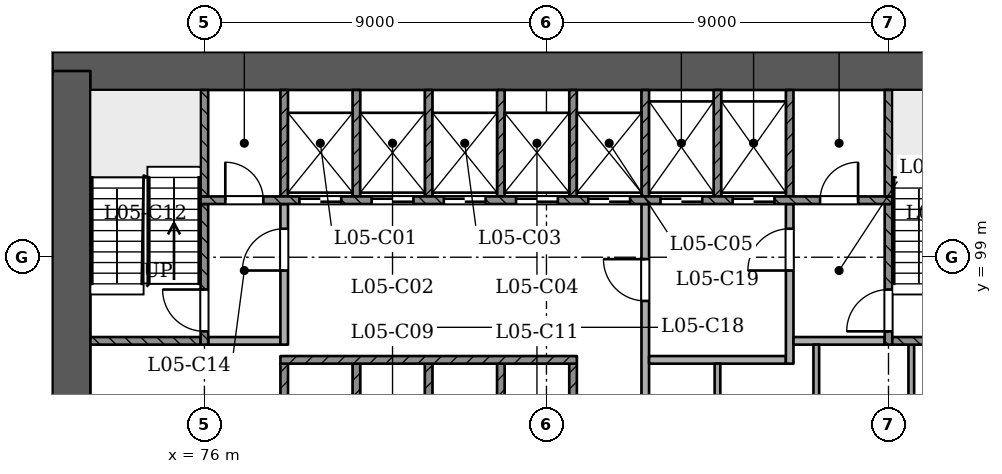
"""IFC4 building model, lengths in metres.
Left out: names, types, materials, properties, quantities, classifications, styles, units other than length and angle.
Written with IfcOpenShell. Run it as: python <this file> out.ifc"""

import sys

from ifc_helpers import new_model, si_unit, direction, frame, frame_2d, origin, place, context, subcontext, project, spatial, rectangle, extrude, element, fill, save


model = new_model("IFC4")
c1 = context("Model", 3, precision=1e-05, world=origin(), true_north=direction((0.0, 1.0)))
c2 = subcontext(c1, "Body", "Model", "MODEL_VIEW")
j1 = project(units=[si_unit("LENGTHUNIT", "METRE"), si_unit("PLANEANGLEUNIT", "RADIAN")], contexts=[c1])
p1 = place(None, origin())
s1 = spatial("IfcSite", under=j1, at=p1, CompositionType="ELEMENT")
p2 = place(p1, origin())
s2 = spatial("IfcBuilding", under=s1, at=p2, CompositionType="ELEMENT")
p3 = place(p2, frame((0.0, 0.0, 27.0)))
s3 = spatial("IfcBuildingStorey", under=s2, at=p3, CompositionType="ELEMENT", Elevation=27.0)
p4 = place(p3, frame((97.5, 103.9, 0.0), z_axis=(0.0, 0.0, 1.0), x_axis=(-1.0, 0.0, 0.0)))
e1 = element("IfcWall", 1, at=p4, inside=s3, PredefinedType="SHEAR", context=c2, shape_type="SweptSolid", body=[
    extrude(rectangle(XDim=25.5, YDim=1.0, at=frame_2d((12.75, 0.0))), origin(), (0.0, 0.0, 1.0), 3.6),
])
p5 = place(p3, frame((72.5, 103.9, 0.0), z_axis=(0.0, 0.0, 1.0), x_axis=(0.0, -1.0, 0.0)))
e2 = element("IfcWall", 2, at=p5, inside=s3, PredefinedType="SHEAR", context=c2, shape_type="SweptSolid", body=[
    extrude(rectangle(XDim=11.5, YDim=1.0, at=frame_2d((5.75, 0.0))), origin(), (0.0, 0.0, 1.0), 3.6),
])
p6 = place(p3, frame((61.193, 96.236, 0.0), z_axis=(0.0, 0.0, 1.0), x_axis=(0.49999953585, -0.866025671762, 0.0)))
e3 = element("IfcWall", 3, at=p6, inside=s3, PredefinedType="PARTITIONING", context=c2, shape_type="SweptSolid", body=[
    extrude(rectangle(XDim=45.0, YDim=0.15, at=frame_2d((22.5, 0.0))), origin(), (0.0, 0.0, 1.0), 2.7),
])
p7 = place(p6, frame((1.75, 0.0, 0.0)))
e4 = element("IfcOpeningElement", 4, at=p7, cuts=e3, PredefinedType="OPENING", context=c2, shape_type="SweptSolid", body=[
    extrude(rectangle(XDim=1.0, YDim=2.1, at=frame_2d((0.5, 1.05))), frame((0.0, 0.085, 0.0), z_axis=(0.0, -1.0, 0.0), x_axis=(1.0, 0.0, 0.0)), (0.0, 0.0, 1.0), 0.171),
])
p8 = place(p6, frame((7.3, 0.0, 0.0)))
e5 = element("IfcOpeningElement", 5, at=p8, cuts=e3, PredefinedType="OPENING", context=c2, shape_type="SweptSolid", body=[
    extrude(rectangle(XDim=1.2, YDim=2.1, at=frame_2d((0.6, 1.05))), frame((0.0, 0.085, 0.0), z_axis=(0.0, -1.0, 0.0), x_axis=(1.0, 0.0, 0.0)), (0.0, 0.0, 1.0), 0.171),
])
p9 = place(p6, frame((14.071, 0.0, 0.0)))
e6 = element("IfcOpeningElement", 6, at=p9, cuts=e3, PredefinedType="OPENING", context=c2, shape_type="SweptSolid", body=[
    extrude(rectangle(XDim=1.1, YDim=2.1, at=frame_2d((0.55, 1.05))), frame((0.0, 0.085, 0.0), z_axis=(0.0, -1.0, 0.0), x_axis=(1.0, 0.0, 0.0)), (0.0, 0.0, 1.0), 0.171),
])
p10 = place(p6, frame((20.78, 0.0, 0.0)))
e7 = element("IfcOpeningElement", 7, at=p10, cuts=e3, PredefinedType="OPENING", context=c2, shape_type="SweptSolid", body=[
    extrude(rectangle(XDim=1.0, YDim=2.1, at=frame_2d((0.5, 1.05))), frame((0.0, 0.085, 0.0), z_axis=(0.0, -1.0, 0.0), x_axis=(1.0, 0.0, 0.0)), (0.0, 0.0, 1.0), 0.171),
])
p11 = place(p6, frame((23.105, 0.0, 0.0)))
e8 = element("IfcOpeningElement", 8, at=p11, cuts=e3, PredefinedType="OPENING", context=c2, shape_type="SweptSolid", body=[
    extrude(rectangle(XDim=1.0, YDim=2.1, at=frame_2d((0.5, 1.05))), frame((0.0, 0.085, 0.0), z_axis=(0.0, -1.0, 0.0), x_axis=(1.0, 0.0, 0.0)), (0.0, 0.0, 1.0), 0.171),
])
p12 = place(p6, frame((28.75, 0.0, 0.0)))
e9 = element("IfcOpeningElement", 9, at=p12, cuts=e3, PredefinedType="OPENING", context=c2, shape_type="SweptSolid", body=[
    extrude(rectangle(XDim=1.0, YDim=2.1, at=frame_2d((0.5, 1.05))), frame((0.0, 0.085, 0.0), z_axis=(0.0, -1.0, 0.0), x_axis=(1.0, 0.0, 0.0)), (0.0, 0.0, 1.0), 0.171),
])
p13 = place(p6, frame((34.3, 0.0, 0.0)))
e10 = element("IfcOpeningElement", 10, at=p13, cuts=e3, PredefinedType="OPENING", context=c2, shape_type="SweptSolid", body=[
    extrude(rectangle(XDim=1.2, YDim=2.1, at=frame_2d((0.6, 1.05))), frame((0.0, 0.085, 0.0), z_axis=(0.0, -1.0, 0.0), x_axis=(1.0, 0.0, 0.0)), (0.0, 0.0, 1.0), 0.171),
])
p14 = place(p6, frame((43.28, 0.0, 0.0)))
e11 = element("IfcOpeningElement", 11, at=p14, cuts=e3, PredefinedType="OPENING", context=c2, shape_type="SweptSolid", body=[
    extrude(rectangle(XDim=1.0, YDim=2.1, at=frame_2d((0.5, 1.05))), frame((0.0, 0.085, 0.0), z_axis=(0.0, -1.0, 0.0), x_axis=(1.0, 0.0, 0.0)), (0.0, 0.0, 1.0), 0.171),
])
for number, where, z_axis, x_axis in (
    (12, (78.1, 93.4, 0.0), (0.0, 0.0, 1.0), (0.0, 1.0, 0.0)),
    (13, (80.0, 93.4, 0.0), (0.0, 0.0, 1.0), (0.0, 1.0, 0.0)),
    (14, (81.9, 93.4, 0.0), (0.0, 0.0, 1.0), (0.0, 1.0, 0.0)),
    (15, (83.8, 93.4, 0.0), (0.0, 0.0, 1.0), (0.0, 1.0, 0.0)),
    (16, (85.7, 93.4, 0.0), (0.0, 0.0, 1.0), (0.0, 1.0, 0.0)),
):
    element("IfcWall", number, at=place(p3, frame(where, z_axis=z_axis, x_axis=x_axis)), inside=s3, PredefinedType="SOLIDWALL", context=c2, shape_type="SweptSolid", body=[
        extrude(rectangle(XDim=2.8, YDim=0.2, at=frame_2d((1.4, 0.0))), origin(), (0.0, 0.0, 1.0), 3.1),
    ])
p15 = place(p3, frame((87.6, 93.4, 0.0), z_axis=(0.0, 0.0, 1.0), x_axis=(0.0, 1.0, 0.0)))
e17 = element("IfcWall", 17, at=p15, inside=s3, PredefinedType="PARTITIONING", context=c2, shape_type="SweptSolid", body=[
    extrude(rectangle(XDim=7.0, YDim=0.2, at=frame_2d((3.5, 0.0))), origin(), (0.0, 0.0, 1.0), 3.1),
])
p16 = place(p15, frame((4.45, 0.0, 0.0)))
e18 = element("IfcOpeningElement", 18, at=p16, cuts=e17, PredefinedType="OPENING", context=c2, shape_type="SweptSolid", body=[
    extrude(rectangle(XDim=1.1, YDim=2.1, at=frame_2d((0.55, 1.05))), frame((0.0, 0.11, 0.0), z_axis=(0.0, -1.0, 0.0), x_axis=(1.0, 0.0, 0.0)), (0.0, 0.0, 1.0), 0.221),
])
p17 = place(p3, frame((89.5, 93.4, 0.0), z_axis=(0.0, 0.0, 1.0), x_axis=(0.0, 1.0, 0.0)))
e19 = element("IfcWall", 19, at=p17, inside=s3, PredefinedType="PARTITIONING", context=c2, shape_type="SweptSolid", body=[
    extrude(rectangle(XDim=2.8, YDim=0.15, at=frame_2d((1.4, 0.0))), origin(), (0.0, 0.0, 1.0), 3.1),
])
for number, where, z_axis, x_axis in (
    (20, (92.1, 93.4, 0.0), (0.0, 0.0, 1.0), (0.0, 1.0, 0.0)),
    (21, (94.6, 93.4, 0.0), (0.0, 0.0, 1.0), (0.0, 1.0, 0.0)),
):
    element("IfcWall", number, at=place(p3, frame(where, z_axis=z_axis, x_axis=x_axis)), inside=s3, PredefinedType="PARTITIONING", context=c2, shape_type="SweptSolid", body=[
        extrude(rectangle(XDim=3.3, YDim=0.15, at=frame_2d((1.65, 0.0))), origin(), (0.0, 0.0, 1.0), 3.1),
    ])
p18 = place(p3, frame((78.0, 96.3, 0.0), z_axis=(0.0, 0.0, 1.0), x_axis=(1.0, 0.0, 0.0)))
e22 = element("IfcWall", 22, at=p18, inside=s3, PredefinedType="SOLIDWALL", context=c2, shape_type="SweptSolid", body=[
    extrude(rectangle(XDim=7.8, YDim=0.2, at=frame_2d((3.9, 0.0))), origin(), (0.0, 0.0, 1.0), 3.1),
])
p19 = place(p3, frame((87.7, 96.3, 0.0), z_axis=(0.0, 0.0, 1.0), x_axis=(1.0, 0.0, 0.0)))
e23 = element("IfcWall", 23, at=p19, inside=s3, PredefinedType="PARTITIONING", context=c2, shape_type="SweptSolid", body=[
    extrude(rectangle(XDim=3.6, YDim=0.2, at=frame_2d((1.8, 0.0))), origin(), (0.0, 0.0, 1.0), 3.1),
])
p20 = place(p3, frame((91.4, 96.2, 0.0), z_axis=(0.0, 0.0, 1.0), x_axis=(0.0, 1.0, 0.0)))
e24 = element("IfcWall", 24, at=p20, inside=s3, PredefinedType="PARTITIONING", context=c2, shape_type="SweptSolid", body=[
    extrude(rectangle(XDim=4.2, YDim=0.2, at=frame_2d((2.1, 0.0))), origin(), (0.0, 0.0, 1.0), 3.1),
])
p21 = place(p20, frame((2.45, 0.0, 0.0)))
e25 = element("IfcOpeningElement", 25, at=p21, cuts=e24, PredefinedType="OPENING", context=c2, shape_type="SweptSolid", body=[
    extrude(rectangle(XDim=1.1, YDim=2.1, at=frame_2d((0.55, 1.05))), frame((0.0, 0.11, 0.0), z_axis=(0.0, -1.0, 0.0), x_axis=(1.0, 0.0, 0.0)), (0.0, 0.0, 1.0), 0.221),
])
p22 = place(p3, frame((73.0, 96.8, 0.0), z_axis=(0.0, 0.0, 1.0), x_axis=(1.0, 0.0, 0.0)))
e26 = element("IfcWall", 26, at=p22, inside=s3, PredefinedType="SOLIDWALL", context=c2, shape_type="SweptSolid", body=[
    extrude(rectangle(XDim=2.9, YDim=0.2, at=frame_2d((1.45, 0.0))), origin(), (0.0, 0.0, 1.0), 3.1),
])
p23 = place(p3, frame((76.0, 96.7, 0.0), z_axis=(0.0, 0.0, 1.0), x_axis=(0.0, 1.0, 0.0)))
e27 = element("IfcWall", 27, at=p23, inside=s3, PredefinedType="SOLIDWALL", context=c2, shape_type="SweptSolid", body=[
    extrude(rectangle(XDim=3.7, YDim=0.2, at=frame_2d((1.85, 0.0))), origin(), (0.0, 0.0, 1.0), 3.1),
])
p24 = place(p23, frame((0.35, 0.0, 0.0)))
e28 = element("IfcOpeningElement", 28, at=p24, cuts=e27, PredefinedType="OPENING", context=c2, shape_type="SweptSolid", body=[
    extrude(rectangle(XDim=1.1, YDim=2.1, at=frame_2d((0.55, 1.05))), frame((0.0, 0.11, 0.0), z_axis=(0.0, -1.0, 0.0), x_axis=(1.0, 0.0, 0.0)), (0.0, 0.0, 1.0), 0.221),
])
p25 = place(p3, frame((76.1, 96.8, 0.0), z_axis=(0.0, 0.0, 1.0), x_axis=(1.0, 0.0, 0.0)))
e29 = element("IfcWall", 29, at=p25, inside=s3, PredefinedType="PARTITIONING", context=c2, shape_type="SweptSolid", body=[
    extrude(rectangle(XDim=1.9, YDim=0.2, at=frame_2d((0.95, 0.0))), origin(), (0.0, 0.0, 1.0), 3.1),
])
p26 = place(p3, frame((78.1, 96.7, 0.0), z_axis=(0.0, 0.0, 1.0), x_axis=(0.0, 1.0, 0.0)))
e30 = element("IfcWall", 30, at=p26, inside=s3, PredefinedType="PARTITIONING", context=c2, shape_type="SweptSolid", body=[
    extrude(rectangle(XDim=3.7, YDim=0.2, at=frame_2d((1.85, 0.0))), origin(), (0.0, 0.0, 1.0), 3.1),
])
p27 = place(p26, frame((1.95, 0.0, 0.0)))
e31 = element("IfcOpeningElement", 31, at=p27, cuts=e30, PredefinedType="OPENING", context=c2, shape_type="SweptSolid", body=[
    extrude(rectangle(XDim=1.1, YDim=2.1, at=frame_2d((0.55, 1.05))), frame((0.0, 0.11, 0.0), z_axis=(0.0, -1.0, 0.0), x_axis=(1.0, 0.0, 0.0)), (0.0, 0.0, 1.0), 0.221),
])
p28 = place(p3, frame((91.5, 96.8, 0.0), z_axis=(0.0, 0.0, 1.0), x_axis=(1.0, 0.0, 0.0)))
e32 = element("IfcWall", 32, at=p28, inside=s3, PredefinedType="PARTITIONING", context=c2, shape_type="SweptSolid", body=[
    extrude(rectangle(XDim=2.4, YDim=0.2, at=frame_2d((1.2, 0.0))), origin(), (0.0, 0.0, 1.0), 3.1),
])
p29 = place(p3, frame((94.0, 96.7, 0.0), z_axis=(0.0, 0.0, 1.0), x_axis=(0.0, 1.0, 0.0)))
e33 = element("IfcWall", 33, at=p29, inside=s3, PredefinedType="SOLIDWALL", context=c2, shape_type="SweptSolid", body=[
    extrude(rectangle(XDim=3.7, YDim=0.2, at=frame_2d((1.85, 0.0))), origin(), (0.0, 0.0, 1.0), 3.1),
])
p30 = place(p29, frame((0.35, 0.0, 0.0)))
e34 = element("IfcOpeningElement", 34, at=p30, cuts=e33, PredefinedType="OPENING", context=c2, shape_type="SweptSolid", body=[
    extrude(rectangle(XDim=1.1, YDim=2.1, at=frame_2d((0.55, 1.05))), frame((0.0, 0.11, 0.0), z_axis=(0.0, -1.0, 0.0), x_axis=(1.0, 0.0, 0.0)), (0.0, 0.0, 1.0), 0.221),
])
p31 = place(p3, frame((94.1, 96.8, 0.0), z_axis=(0.0, 0.0, 1.0), x_axis=(1.0, 0.0, 0.0)))
e35 = element("IfcWall", 35, at=p31, inside=s3, PredefinedType="SOLIDWALL", context=c2, shape_type="SweptSolid", body=[
    extrude(rectangle(XDim=2.9, YDim=0.2, at=frame_2d((1.45, 0.0))), origin(), (0.0, 0.0, 1.0), 3.1),
])
p32 = place(p3, frame((75.9, 100.5, 0.0), z_axis=(0.0, 0.0, 1.0), x_axis=(1.0, 0.0, 0.0)))
e36 = element("IfcWall", 36, at=p32, inside=s3, PredefinedType="SOLIDWALL", context=c2, shape_type="SweptSolid", body=[
    extrude(rectangle(XDim=18.2, YDim=0.2, at=frame_2d((9.1, 0.0))), origin(), (0.0, 0.0, 1.0), 3.1),
])
p33 = place(p32, frame((2.6, 0.0, 0.0)))
e37 = element("IfcOpeningElement", 37, at=p33, cuts=e36, PredefinedType="OPENING", context=c2, shape_type="SweptSolid", body=[
    extrude(rectangle(XDim=1.1, YDim=2.1, at=frame_2d((0.55, 1.05))), frame((0.0, 0.11, 0.0), z_axis=(0.0, -1.0, 0.0), x_axis=(1.0, 0.0, 0.0)), (0.0, 0.0, 1.0), 0.221),
])
p34 = place(p32, frame((4.5, 0.0, 0.0)))
e38 = element("IfcOpeningElement", 38, at=p34, cuts=e36, PredefinedType="OPENING", context=c2, shape_type="SweptSolid", body=[
    extrude(rectangle(XDim=1.1, YDim=2.1, at=frame_2d((0.55, 1.05))), frame((0.0, 0.11, 0.0), z_axis=(0.0, -1.0, 0.0), x_axis=(1.0, 0.0, 0.0)), (0.0, 0.0, 1.0), 0.221),
])
p35 = place(p32, frame((6.4, 0.0, 0.0)))
e39 = element("IfcOpeningElement", 39, at=p35, cuts=e36, PredefinedType="OPENING", context=c2, shape_type="SweptSolid", body=[
    extrude(rectangle(XDim=1.1, YDim=2.1, at=frame_2d((0.55, 1.05))), frame((0.0, 0.11, 0.0), z_axis=(0.0, -1.0, 0.0), x_axis=(1.0, 0.0, 0.0)), (0.0, 0.0, 1.0), 0.221),
])
p36 = place(p32, frame((8.3, 0.0, 0.0)))
e40 = element("IfcOpeningElement", 40, at=p36, cuts=e36, PredefinedType="OPENING", context=c2, shape_type="SweptSolid", body=[
    extrude(rectangle(XDim=1.1, YDim=2.1, at=frame_2d((0.55, 1.05))), frame((0.0, 0.11, 0.0), z_axis=(0.0, -1.0, 0.0), x_axis=(1.0, 0.0, 0.0)), (0.0, 0.0, 1.0), 0.221),
])
p37 = place(p32, frame((10.2, 0.0, 0.0)))
e41 = element("IfcOpeningElement", 41, at=p37, cuts=e36, PredefinedType="OPENING", context=c2, shape_type="SweptSolid", body=[
    extrude(rectangle(XDim=1.1, YDim=2.1, at=frame_2d((0.55, 1.05))), frame((0.0, 0.11, 0.0), z_axis=(0.0, -1.0, 0.0), x_axis=(1.0, 0.0, 0.0)), (0.0, 0.0, 1.0), 0.221),
])
p38 = place(p32, frame((12.1, 0.0, 0.0)))
e42 = element("IfcOpeningElement", 42, at=p38, cuts=e36, PredefinedType="OPENING", context=c2, shape_type="SweptSolid", body=[
    extrude(rectangle(XDim=1.1, YDim=2.1, at=frame_2d((0.55, 1.05))), frame((0.0, 0.11, 0.0), z_axis=(0.0, -1.0, 0.0), x_axis=(1.0, 0.0, 0.0)), (0.0, 0.0, 1.0), 0.221),
])
p39 = place(p32, frame((14.0, 0.0, 0.0)))
e43 = element("IfcOpeningElement", 43, at=p39, cuts=e36, PredefinedType="OPENING", context=c2, shape_type="SweptSolid", body=[
    extrude(rectangle(XDim=1.1, YDim=2.1, at=frame_2d((0.55, 1.05))), frame((0.0, 0.11, 0.0), z_axis=(0.0, -1.0, 0.0), x_axis=(1.0, 0.0, 0.0)), (0.0, 0.0, 1.0), 0.221),
])
p40 = place(p32, frame((0.65, 0.0, 0.0)))
e44 = element("IfcOpeningElement", 44, at=p40, cuts=e36, PredefinedType="OPENING", context=c2, shape_type="SweptSolid", body=[
    extrude(rectangle(XDim=1.0, YDim=2.1, at=frame_2d((0.5, 1.05))), frame((0.0, 0.11, 0.0), z_axis=(0.0, -1.0, 0.0), x_axis=(1.0, 0.0, 0.0)), (0.0, 0.0, 1.0), 0.221),
])
p41 = place(p32, frame((16.3, 0.0, 0.0)))
e45 = element("IfcOpeningElement", 45, at=p41, cuts=e36, PredefinedType="OPENING", context=c2, shape_type="SweptSolid", body=[
    extrude(rectangle(XDim=1.0, YDim=2.1, at=frame_2d((0.5, 1.05))), frame((0.0, 0.11, 0.0), z_axis=(0.0, -1.0, 0.0), x_axis=(1.0, 0.0, 0.0)), (0.0, 0.0, 1.0), 0.221),
])
for number, where, z_axis, x_axis in (
    (46, (76.0, 100.6, 0.0), (0.0, 0.0, 1.0), (0.0, 1.0, 0.0)),
    (47, (78.1, 100.6, 0.0), (0.0, 0.0, 1.0), (0.0, 1.0, 0.0)),
    (48, (80.0, 100.6, 0.0), (0.0, 0.0, 1.0), (0.0, 1.0, 0.0)),
    (49, (81.9, 100.6, 0.0), (0.0, 0.0, 1.0), (0.0, 1.0, 0.0)),
    (50, (83.8, 100.6, 0.0), (0.0, 0.0, 1.0), (0.0, 1.0, 0.0)),
    (51, (85.7, 100.6, 0.0), (0.0, 0.0, 1.0), (0.0, 1.0, 0.0)),
    (52, (87.6, 100.6, 0.0), (0.0, 0.0, 1.0), (0.0, 1.0, 0.0)),
    (53, (89.5, 100.6, 0.0), (0.0, 0.0, 1.0), (0.0, 1.0, 0.0)),
    (54, (91.4, 100.6, 0.0), (0.0, 0.0, 1.0), (0.0, 1.0, 0.0)),
    (55, (94.0, 100.6, 0.0), (0.0, 0.0, 1.0), (0.0, 1.0, 0.0)),
):
    element("IfcWall", number, at=place(p3, frame(where, z_axis=z_axis, x_axis=x_axis)), inside=s3, PredefinedType="SOLIDWALL", context=c2, shape_type="SweptSolid", body=[
        extrude(rectangle(XDim=2.8, YDim=0.2, at=frame_2d((1.4, 0.0))), origin(), (0.0, 0.0, 1.0), 3.1),
    ])
p42 = place(p33, origin())
e56 = element("IfcDoor", 56, at=p42, inside=s3, OperationType="SLIDING_TO_RIGHT", PredefinedType="NOTDEFINED", context=c2, shape_type="SweptSolid", body=[
    extrude(rectangle(XDim=1.1, YDim=2.1, at=frame_2d((0.55, 1.05))), frame((0.0, 0.025, 0.0), z_axis=(0.0, -1.0, 0.0), x_axis=(1.0, 0.0, 0.0)), (0.0, 0.0, 1.0), 0.05),
])
fill(e37, e56)
p43 = place(p34, origin())
e57 = element("IfcDoor", 57, at=p43, inside=s3, OperationType="SLIDING_TO_LEFT", PredefinedType="NOTDEFINED", context=c2, shape_type="SweptSolid", body=[
    extrude(rectangle(XDim=1.1, YDim=2.1, at=frame_2d((0.55, 1.05))), frame((0.0, 0.025, 0.0), z_axis=(0.0, -1.0, 0.0), x_axis=(1.0, 0.0, 0.0)), (0.0, 0.0, 1.0), 0.05),
])
fill(e38, e57)
p44 = place(p35, origin())
e58 = element("IfcDoor", 58, at=p44, inside=s3, OperationType="SLIDING_TO_RIGHT", PredefinedType="NOTDEFINED", context=c2, shape_type="SweptSolid", body=[
    extrude(rectangle(XDim=1.1, YDim=2.1, at=frame_2d((0.55, 1.05))), frame((0.0, 0.025, 0.0), z_axis=(0.0, -1.0, 0.0), x_axis=(1.0, 0.0, 0.0)), (0.0, 0.0, 1.0), 0.05),
])
fill(e39, e58)
p45 = place(p36, origin())
e59 = element("IfcDoor", 59, at=p45, inside=s3, OperationType="SLIDING_TO_LEFT", PredefinedType="NOTDEFINED", context=c2, shape_type="SweptSolid", body=[
    extrude(rectangle(XDim=1.1, YDim=2.1, at=frame_2d((0.55, 1.05))), frame((0.0, 0.025, 0.0), z_axis=(0.0, -1.0, 0.0), x_axis=(1.0, 0.0, 0.0)), (0.0, 0.0, 1.0), 0.05),
])
fill(e40, e59)
p46 = place(p37, origin())
e60 = element("IfcDoor", 60, at=p46, inside=s3, OperationType="SLIDING_TO_RIGHT", PredefinedType="NOTDEFINED", context=c2, shape_type="SweptSolid", body=[
    extrude(rectangle(XDim=1.1, YDim=2.1, at=frame_2d((0.55, 1.05))), frame((0.0, 0.025, 0.0), z_axis=(0.0, -1.0, 0.0), x_axis=(1.0, 0.0, 0.0)), (0.0, 0.0, 1.0), 0.05),
])
fill(e41, e60)
p47 = place(p38, origin())
e61 = element("IfcDoor", 61, at=p47, inside=s3, OperationType="SLIDING_TO_RIGHT", PredefinedType="NOTDEFINED", context=c2, shape_type="SweptSolid", body=[
    extrude(rectangle(XDim=1.1, YDim=2.1, at=frame_2d((0.55, 1.05))), frame((0.0, 0.025, 0.0), z_axis=(0.0, -1.0, 0.0), x_axis=(1.0, 0.0, 0.0)), (0.0, 0.0, 1.0), 0.05),
])
fill(e42, e61)
p48 = place(p39, origin())
e62 = element("IfcDoor", 62, at=p48, inside=s3, OperationType="SLIDING_TO_LEFT", PredefinedType="NOTDEFINED", context=c2, shape_type="SweptSolid", body=[
    extrude(rectangle(XDim=1.1, YDim=2.1, at=frame_2d((0.55, 1.05))), frame((0.0, 0.025, 0.0), z_axis=(0.0, -1.0, 0.0), x_axis=(1.0, 0.0, 0.0)), (0.0, 0.0, 1.0), 0.05),
])
fill(e43, e62)
p49 = place(p24, origin())
e63 = element("IfcDoor", 63, at=p49, inside=s3, OperationType="SINGLE_SWING_RIGHT", PredefinedType="NOTDEFINED", context=c2, shape_type="SweptSolid", body=[
    extrude(rectangle(XDim=1.1, YDim=2.1, at=frame_2d((0.55, 1.05))), frame((0.0, 0.025, 0.0), z_axis=(0.0, -1.0, 0.0), x_axis=(1.0, 0.0, 0.0)), (0.0, 0.0, 1.0), 0.05),
])
fill(e28, e63)
p50 = place(p30, origin())
e64 = element("IfcDoor", 64, at=p50, inside=s3, OperationType="SINGLE_SWING_LEFT", PredefinedType="NOTDEFINED", context=c2, shape_type="SweptSolid", body=[
    extrude(rectangle(XDim=1.1, YDim=2.1, at=frame_2d((0.55, 1.05))), frame((0.0, 0.025, 0.0), z_axis=(0.0, -1.0, 0.0), x_axis=(1.0, 0.0, 0.0)), (0.0, 0.0, 1.0), 0.05),
])
fill(e34, e64)
p51 = place(p27, origin())
e65 = element("IfcDoor", 65, at=p51, inside=s3, OperationType="SINGLE_SWING_LEFT", PredefinedType="NOTDEFINED", context=c2, shape_type="SweptSolid", body=[
    extrude(rectangle(XDim=1.1, YDim=2.1, at=frame_2d((0.55, 1.05))), frame((0.0, 0.025, 0.0), z_axis=(0.0, -1.0, 0.0), x_axis=(1.0, 0.0, 0.0)), (0.0, 0.0, 1.0), 0.05),
])
fill(e31, e65)
p52 = place(p16, origin())
e66 = element("IfcDoor", 66, at=p52, inside=s3, OperationType="SINGLE_SWING_RIGHT", PredefinedType="NOTDEFINED", context=c2, shape_type="SweptSolid", body=[
    extrude(rectangle(XDim=1.1, YDim=2.1, at=frame_2d((0.55, 1.05))), frame((0.0, 0.025, 0.0), z_axis=(0.0, -1.0, 0.0), x_axis=(1.0, 0.0, 0.0)), (0.0, 0.0, 1.0), 0.05),
])
fill(e18, e66)
p53 = place(p21, origin())
e67 = element("IfcDoor", 67, at=p53, inside=s3, OperationType="SINGLE_SWING_LEFT", PredefinedType="NOTDEFINED", context=c2, shape_type="SweptSolid", body=[
    extrude(rectangle(XDim=1.1, YDim=2.1, at=frame_2d((0.55, 1.05))), frame((0.0, 0.025, 0.0), z_axis=(0.0, -1.0, 0.0), x_axis=(1.0, 0.0, 0.0)), (0.0, 0.0, 1.0), 0.05),
])
fill(e25, e67)
p54 = place(p40, origin())
e68 = element("IfcDoor", 68, at=p54, inside=s3, OperationType="SINGLE_SWING_LEFT", PredefinedType="NOTDEFINED", context=c2, shape_type="SweptSolid", body=[
    extrude(rectangle(XDim=1.0, YDim=2.1, at=frame_2d((0.5, 1.05))), frame((0.0, 0.025, 0.0), z_axis=(0.0, -1.0, 0.0), x_axis=(1.0, 0.0, 0.0)), (0.0, 0.0, 1.0), 0.05),
])
fill(e44, e68)
p55 = place(p41, origin())
e69 = element("IfcDoor", 69, at=p55, inside=s3, OperationType="SINGLE_SWING_RIGHT", PredefinedType="NOTDEFINED", context=c2, shape_type="SweptSolid", body=[
    extrude(rectangle(XDim=1.0, YDim=2.1, at=frame_2d((0.5, 1.05))), frame((0.0, 0.025, 0.0), z_axis=(0.0, -1.0, 0.0), x_axis=(1.0, 0.0, 0.0)), (0.0, 0.0, 1.0), 0.05),
])
fill(e45, e69)
save(model, sys.argv[1])
